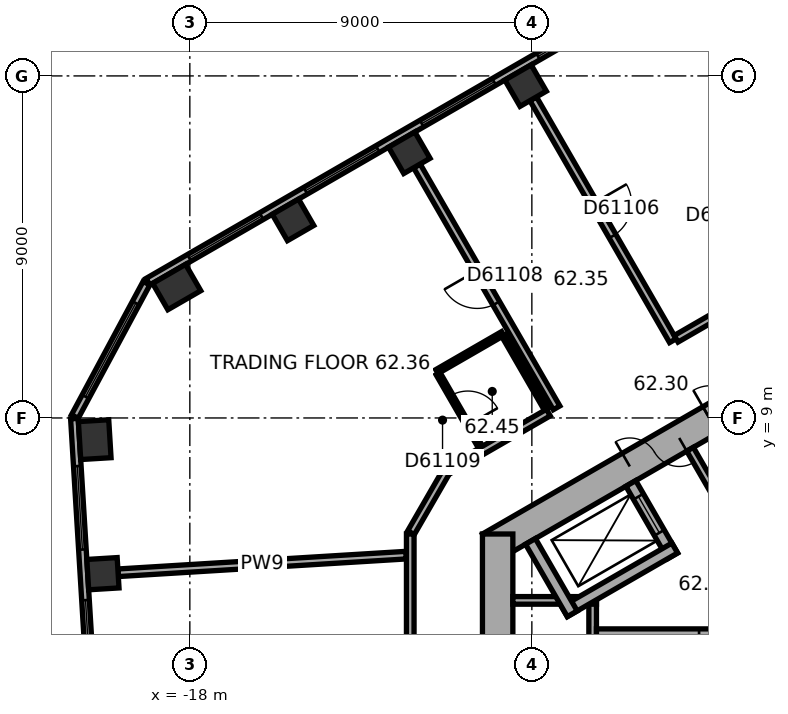
"""IFC4 building model, lengths in metres.
Left out: names, types, materials, properties, quantities, classifications, styles, units other than length and angle.
Written with IfcOpenShell. Run it as: python <this file> out.ifc"""

import sys

from ifc_helpers import new_model, si_unit, direction, frame, frame_2d, origin, origin_2d, place, context, subcontext, project, spatial, rectangle, extrude, element, fill, save


model = new_model("IFC4")
c1 = context("Model", 3, precision=1e-05, world=origin(), true_north=direction((0.0, 1.0)))
c2 = subcontext(c1, "Body", "Model", "MODEL_VIEW")
j1 = project(units=[si_unit("LENGTHUNIT", "METRE"), si_unit("PLANEANGLEUNIT", "RADIAN")], contexts=[c1])
p1 = place(None, origin())
s1 = spatial("IfcSite", under=j1, at=p1, CompositionType="ELEMENT")
p2 = place(p1, origin())
s2 = spatial("IfcBuilding", under=s1, at=p2, CompositionType="ELEMENT")
p3 = place(p2, frame((0.0, 0.0, 251.3)))
s3 = spatial("IfcBuildingStorey", under=s2, at=p3, CompositionType="ELEMENT", Elevation=251.3)
for number, where, z_axis, x_axis in (
    (1, (-9.165, 17.745, 0.0), (0.0, 0.0, 1.0), (-0.866, -0.5, 0.0)),
    (2, (-12.225, 15.978, 0.0), (0.0, 0.0, 1.0), (-0.866, -0.5, 0.0)),
    (3, (-15.285, 14.211, 0.0), (0.0, 0.0, 1.0), (-0.866, -0.5, 0.0)),
):
    element("IfcColumn", number, at=place(p3, frame(where, z_axis=z_axis, x_axis=x_axis)), inside=s3, PredefinedType="COLUMN", context=c2, shape_type="SweptSolid", body=[
        extrude(rectangle(XDim=0.8, YDim=0.8, at=origin_2d()), origin(), (0.0, 0.0, 1.0), 3.7),
    ])
for number, where, z_axis, x_axis in (
    (4, (-18.345, 12.445, 0.0), (0.0, 0.0, 1.0), (-0.866, -0.5, 0.0)),
    (5, (-20.503, 8.429, 0.0), (0.0, 0.0, 1.0), (0.061, -0.998, 0.0)),
):
    element("IfcColumn", number, at=place(p3, frame(where, z_axis=z_axis, x_axis=x_axis)), inside=s3, PredefinedType="COLUMN", context=c2, shape_type="SweptSolid", body=[
        extrude(rectangle(XDim=1.0, YDim=0.8, at=origin_2d()), origin(), (0.0, 0.0, 1.0), 3.7),
    ])
p4 = place(p3, frame((-20.287, 4.902, 0.0), z_axis=(0.0, 0.0, 1.0), x_axis=(0.061048539535, -0.998134798422, 0.0)))
e6 = element("IfcColumn", 6, at=p4, inside=s3, PredefinedType="COLUMN", context=c2, shape_type="SweptSolid", body=[
    extrude(rectangle(XDim=0.8, YDim=0.8, at=origin_2d()), origin(), (0.0, 0.0, 1.0), 3.7),
])
p5 = place(p3, frame((0.2, 11.547, 0.0), z_axis=(0.0, 0.0, 1.0), x_axis=(-0.866023897231, -0.500002609418, 0.0)))
e7 = element("IfcWall", 7, at=p5, inside=s3, PredefinedType="SHEAR", context=c2, shape_type="SweptSolid", body=[
    extrude(rectangle(XDim=11.894, YDim=0.8, at=frame_2d((5.947, 0.0))), origin(), (0.0, 0.0, 1.0), 3.7),
])
p6 = place(p5, frame((6.147, 0.0, 0.0)))
e8 = element("IfcOpeningElement", 8, at=p6, cuts=e7, PredefinedType="OPENING", context=c2, shape_type="SweptSolid", body=[
    extrude(rectangle(XDim=1.5, YDim=2.1, at=frame_2d((0.75, 1.05))), frame((0.0, 0.41, 0.0), z_axis=(0.0, -1.0, 0.0), x_axis=(1.0, 0.0, 0.0)), (0.0, 0.0, 1.0), 0.82),
])
p7 = place(p5, frame((1.697, 0.0, 0.0)))
e9 = element("IfcOpeningElement", 9, at=p7, cuts=e7, PredefinedType="OPENING", context=c2, shape_type="SweptSolid", body=[
    extrude(rectangle(XDim=0.9, YDim=2.1, at=frame_2d((0.45, 1.05))), frame((0.0, 0.41, 0.0), z_axis=(0.0, -1.0, 0.0), x_axis=(1.0, 0.0, 0.0)), (0.0, 0.0, 1.0), 0.82),
])
p8 = place(p5, frame((4.297, 0.0, 0.0)))
e10 = element("IfcOpeningElement", 10, at=p8, cuts=e7, PredefinedType="OPENING", context=c2, shape_type="SweptSolid", body=[
    extrude(rectangle(XDim=0.9, YDim=2.1, at=frame_2d((0.45, 1.05))), frame((0.0, 0.41, 0.0), z_axis=(0.0, -1.0, 0.0), x_axis=(1.0, 0.0, 0.0)), (0.0, 0.0, 1.0), 0.82),
])
p9 = place(p3, frame((-9.9, 5.947, 0.0), z_axis=(0.0, 0.0, 1.0), x_axis=(0.0, -1.0, 0.0)))
e11 = element("IfcWall", 11, at=p9, inside=s3, PredefinedType="SHEAR", context=c2, shape_type="SweptSolid", body=[
    extrude(rectangle(XDim=11.894, YDim=0.8, at=frame_2d((5.947, 0.0))), origin(), (0.0, 0.0, 1.0), 3.7),
])
p10 = place(p9, frame((5.097, 0.0, 0.0)))
e12 = element("IfcOpeningElement", 12, at=p10, cuts=e11, PredefinedType="OPENING", context=c2, shape_type="SweptSolid", body=[
    extrude(rectangle(XDim=1.1, YDim=2.1, at=frame_2d((0.55, 1.05))), frame((0.0, 0.41, 0.0), z_axis=(0.0, -1.0, 0.0), x_axis=(1.0, 0.0, 0.0)), (0.0, 0.0, 1.0), 0.82),
])
p11 = place(p9, frame((7.697, 0.0, 0.0)))
e13 = element("IfcOpeningElement", 13, at=p11, cuts=e11, PredefinedType="OPENING", context=c2, shape_type="SweptSolid", body=[
    extrude(rectangle(XDim=1.1, YDim=2.1, at=frame_2d((0.55, 1.05))), frame((0.0, 0.41, 0.0), z_axis=(0.0, -1.0, 0.0), x_axis=(1.0, 0.0, 0.0)), (0.0, 0.0, 1.0), 0.82),
])
p12 = place(p3, frame((-2.786, 22.005, 0.0), z_axis=(0.0, 0.0, 1.0), x_axis=(-0.866026555358, -0.49999800541, 0.0)))
e14 = element("IfcWall", 14, at=p12, inside=s3, PredefinedType="STANDARD", context=c2, shape_type="SweptSolid", body=[
    extrude(rectangle(XDim=18.841, YDim=0.2, at=frame_2d((9.421, 0.0))), origin(), (0.0, 0.0, 1.0), 3.7),
])
p13 = place(p12, frame((1.254, 0.0, 0.9)))
e15 = element("IfcOpeningElement", 15, at=p13, cuts=e14, PredefinedType="OPENING", context=c2, shape_type="SweptSolid", body=[
    extrude(rectangle(XDim=2.2, YDim=2.0, at=frame_2d((1.1, 1.0))), frame((0.0, 0.11, 0.0), z_axis=(0.0, -1.0, 0.0), x_axis=(1.0, 0.0, 0.0)), (0.0, 0.0, 1.0), 0.22),
])
p14 = place(p12, frame((4.788, 0.0, 0.9)))
e16 = element("IfcOpeningElement", 16, at=p14, cuts=e14, PredefinedType="OPENING", context=c2, shape_type="SweptSolid", body=[
    extrude(rectangle(XDim=2.2, YDim=2.0, at=frame_2d((1.1, 1.0))), frame((0.0, 0.11, 0.0), z_axis=(0.0, -1.0, 0.0), x_axis=(1.0, 0.0, 0.0)), (0.0, 0.0, 1.0), 0.22),
])
p15 = place(p12, frame((8.321, 0.0, 0.9)))
e17 = element("IfcOpeningElement", 17, at=p15, cuts=e14, PredefinedType="OPENING", context=c2, shape_type="SweptSolid", body=[
    extrude(rectangle(XDim=2.2, YDim=2.0, at=frame_2d((1.1, 1.0))), frame((0.0, 0.11, 0.0), z_axis=(0.0, -1.0, 0.0), x_axis=(1.0, 0.0, 0.0)), (0.0, 0.0, 1.0), 0.22),
])
p16 = place(p12, frame((11.855, 0.0, 0.9)))
e18 = element("IfcOpeningElement", 18, at=p16, cuts=e14, PredefinedType="OPENING", context=c2, shape_type="SweptSolid", body=[
    extrude(rectangle(XDim=2.2, YDim=2.0, at=frame_2d((1.1, 1.0))), frame((0.0, 0.11, 0.0), z_axis=(0.0, -1.0, 0.0), x_axis=(1.0, 0.0, 0.0)), (0.0, 0.0, 1.0), 0.22),
])
p17 = place(p12, frame((15.389, 0.0, 0.9)))
e19 = element("IfcOpeningElement", 19, at=p17, cuts=e14, PredefinedType="OPENING", context=c2, shape_type="SweptSolid", body=[
    extrude(rectangle(XDim=2.2, YDim=2.0, at=frame_2d((1.1, 1.0))), frame((0.0, 0.11, 0.0), z_axis=(0.0, -1.0, 0.0), x_axis=(1.0, 0.0, 0.0)), (0.0, 0.0, 1.0), 0.22),
])
p18 = place(p3, frame((-19.141, 12.545, 0.0), z_axis=(0.0, 0.0, 1.0), x_axis=(-0.473306370921, -0.880897882416, 0.0)))
e20 = element("IfcWall", 20, at=p18, inside=s3, PredefinedType="STANDARD", context=c2, shape_type="SweptSolid", body=[
    extrude(rectangle(XDim=3.983, YDim=0.2, at=frame_2d((1.991, 0.0))), origin(), (0.0, 0.0, 1.0), 3.7),
])
p19 = place(p18, frame((0.591, 0.0, 0.9)))
e21 = element("IfcOpeningElement", 21, at=p19, cuts=e20, PredefinedType="OPENING", context=c2, shape_type="SweptSolid", body=[
    extrude(rectangle(XDim=2.8, YDim=2.0, at=frame_2d((1.4, 1.0))), frame((0.0, 0.11, 0.0), z_axis=(0.0, -1.0, 0.0), x_axis=(1.0, 0.0, 0.0)), (0.0, 0.0, 1.0), 0.22),
])
p20 = place(p3, frame((-21.038, 8.984, 0.0), z_axis=(0.0, 0.0, 1.0), x_axis=(0.061043935634, -0.998135079998, 0.0)))
e22 = element("IfcWall", 22, at=p20, inside=s3, PredefinedType="STANDARD", context=c2, shape_type="SweptSolid", body=[
    extrude(rectangle(XDim=18.841, YDim=0.2, at=frame_2d((9.421, 0.0))), origin(), (0.0, 0.0, 1.0), 3.7),
])
p21 = place(p20, frame((1.253, 0.0, 0.9)))
e23 = element("IfcOpeningElement", 23, at=p21, cuts=e22, PredefinedType="OPENING", context=c2, shape_type="SweptSolid", body=[
    extrude(rectangle(XDim=2.2, YDim=2.0, at=frame_2d((1.1, 1.0))), frame((0.0, 0.11, 0.0), z_axis=(0.0, -1.0, 0.0), x_axis=(1.0, 0.0, 0.0)), (0.0, 0.0, 1.0), 0.22),
])
p22 = place(p20, frame((4.786, 0.0, 0.9)))
e24 = element("IfcOpeningElement", 24, at=p22, cuts=e22, PredefinedType="OPENING", context=c2, shape_type="SweptSolid", body=[
    extrude(rectangle(XDim=2.2, YDim=2.0, at=frame_2d((1.1, 1.0))), frame((0.0, 0.11, 0.0), z_axis=(0.0, -1.0, 0.0), x_axis=(1.0, 0.0, 0.0)), (0.0, 0.0, 1.0), 0.22),
])
p23 = place(p20, frame((8.32, 0.0, 0.9)))
e25 = element("IfcOpeningElement", 25, at=p23, cuts=e22, PredefinedType="OPENING", context=c2, shape_type="SweptSolid", body=[
    extrude(rectangle(XDim=2.2, YDim=2.0, at=frame_2d((1.1, 1.0))), frame((0.0, 0.11, 0.0), z_axis=(0.0, -1.0, 0.0), x_axis=(1.0, 0.0, 0.0)), (0.0, 0.0, 1.0), 0.22),
])
p24 = place(p20, frame((11.854, 0.0, 0.9)))
e26 = element("IfcOpeningElement", 26, at=p24, cuts=e22, PredefinedType="OPENING", context=c2, shape_type="SweptSolid", body=[
    extrude(rectangle(XDim=2.2, YDim=2.0, at=frame_2d((1.1, 1.0))), frame((0.0, 0.11, 0.0), z_axis=(0.0, -1.0, 0.0), x_axis=(1.0, 0.0, 0.0)), (0.0, 0.0, 1.0), 0.22),
])
p25 = place(p20, frame((15.387, 0.0, 0.9)))
e27 = element("IfcOpeningElement", 27, at=p25, cuts=e22, PredefinedType="OPENING", context=c2, shape_type="SweptSolid", body=[
    extrude(rectangle(XDim=2.2, YDim=2.0, at=frame_2d((1.1, 1.0))), frame((0.0, 0.11, 0.0), z_axis=(0.0, -1.0, 0.0), x_axis=(1.0, 0.0, 0.0)), (0.0, 0.0, 1.0), 0.22),
])
p26 = place(p3, frame((-3.737, 6.272, 0.0), z_axis=(0.0, 0.0, 1.0), x_axis=(-0.50002983664, 0.866008176907, 0.0)))
e28 = element("IfcWall", 28, at=p26, inside=s3, PredefinedType="PARTITIONING", context=c2, shape_type="SweptSolid", body=[
    extrude(rectangle(XDim=2.2, YDim=0.2, at=frame_2d((1.1, 0.0))), origin(), (0.0, 0.0, 1.0), 3.35),
])
p27 = place(p3, frame((-7.4, 4.3, 0.0), z_axis=(0.0, 0.0, 1.0), x_axis=(0.0, -1.0, 0.0)))
e29 = element("IfcWall", 29, at=p27, inside=s3, PredefinedType="PARTITIONING", context=c2, shape_type="SweptSolid", body=[
    extrude(rectangle(XDim=8.0, YDim=0.2, at=frame_2d((4.0, 0.0))), origin(), (0.0, 0.0, 1.0), 3.35),
])
p28 = place(p3, frame((-7.3, 4.2, 0.0), z_axis=(0.0, 0.0, 1.0), x_axis=(-1.0, 0.0, 0.0)))
e30 = element("IfcWall", 30, at=p28, inside=s3, PredefinedType="PARTITIONING", context=c2, shape_type="SweptSolid", body=[
    extrude(rectangle(XDim=2.2, YDim=0.2, at=frame_2d((1.1, 0.0))), origin(), (0.0, 0.0, 1.0), 3.35),
])
p29 = place(p3, frame((-2.6, 3.3, 0.0), z_axis=(0.0, 0.0, 1.0), x_axis=(-1.0, 0.0, 0.0)))
e31 = element("IfcWall", 31, at=p29, inside=s3, PredefinedType="SHEAR", context=c2, shape_type="SweptSolid", body=[
    extrude(rectangle(XDim=4.7, YDim=0.3, at=frame_2d((2.35, 0.0))), origin(), (0.0, 0.0, 1.0), 3.35),
])
p30 = place(p29, frame((0.8, 0.0, 0.0)))
e32 = element("IfcOpeningElement", 32, at=p30, cuts=e31, PredefinedType="OPENING", context=c2, shape_type="SweptSolid", body=[
    extrude(rectangle(XDim=1.2, YDim=2.1, at=frame_2d((0.6, 1.05))), frame((0.0, 0.16, 0.0), z_axis=(0.0, -1.0, 0.0), x_axis=(1.0, 0.0, 0.0)), (0.0, 0.0, 1.0), 0.32),
])
p31 = place(p3, frame((-5.295, 5.372, 0.0), z_axis=(0.0, 0.0, 1.0), x_axis=(-0.500077893725, 0.86598042715, 0.0)))
e33 = element("IfcWall", 33, at=p31, inside=s3, PredefinedType="SHEAR", context=c2, shape_type="SweptSolid", body=[
    extrude(rectangle(XDim=2.2, YDim=0.3, at=frame_2d((1.1, 0.0))), origin(), (0.0, 0.0, 1.0), 3.35),
])
p32 = place(p31, frame((0.7, 0.0, 0.0)))
e34 = element("IfcOpeningElement", 34, at=p32, cuts=e33, PredefinedType="OPENING", context=c2, shape_type="SweptSolid", body=[
    extrude(rectangle(XDim=1.1, YDim=2.1, at=frame_2d((0.55, 1.05))), frame((0.0, 0.16, 0.0), z_axis=(0.0, -1.0, 0.0), x_axis=(1.0, 0.0, 0.0)), (0.0, 0.0, 1.0), 0.32),
])
p33 = place(p3, frame((-5.24, 5.577, 0.0), z_axis=(0.0, 0.0, 1.0), x_axis=(-0.866014461049, -0.500018952895, 0.0)))
e35 = element("IfcWall", 35, at=p33, inside=s3, PredefinedType="SHEAR", context=c2, shape_type="SweptSolid", body=[
    extrude(rectangle(XDim=3.35, YDim=0.3, at=frame_2d((1.675, 0.0))), origin(), (0.0, 0.0, 1.0), 3.35),
])
p34 = place(p3, frame((-7.937, 3.847, 0.0), z_axis=(0.0, 0.0, 1.0), x_axis=(-0.50002983664, 0.866008176907, 0.0)))
e36 = element("IfcWall", 36, at=p34, inside=s3, PredefinedType="SHEAR", context=c2, shape_type="SweptSolid", body=[
    extrude(rectangle(XDim=2.2, YDim=0.3, at=frame_2d((1.1, 0.0))), origin(), (0.0, 0.0, 1.0), 3.35),
])
p35 = place(p3, frame((-19.888, 4.927, 0.0), z_axis=(0.0, 0.0, 1.0), x_axis=(0.998133794525, 0.061064950896, 0.0)))
e37 = element("IfcWall", 37, at=p35, inside=s3, PredefinedType="PARTITIONING", context=c2, shape_type="SweptSolid", body=[
    extrude(rectangle(XDim=7.592, YDim=0.2, at=frame_2d((3.796, 0.0))), origin(), (0.0, 0.0, 1.0), 3.35),
])
p36 = place(p3, frame((-12.2, 5.947, 0.0), z_axis=(0.0, 0.0, 1.0), x_axis=(0.0, -1.0, 0.0)))
e38 = element("IfcWall", 38, at=p36, inside=s3, PredefinedType="PARTITIONING", context=c2, shape_type="SweptSolid", body=[
    extrude(rectangle(XDim=3.746, YDim=0.2, at=frame_2d((1.873, 0.0))), origin(), (0.0, 0.0, 1.0), 3.35),
])
p37 = place(p3, frame((-12.025, 15.632, 0.0), z_axis=(0.0, 0.0, 1.0), x_axis=(0.499983153418, -0.866035129944, 0.0)))
e39 = element("IfcWall", 39, at=p37, inside=s3, PredefinedType="PARTITIONING", context=c2, shape_type="SweptSolid", body=[
    extrude(rectangle(XDim=7.35, YDim=0.2, at=frame_2d((3.675, 0.0))), origin(), (0.0, 0.0, 1.0), 3.35),
])
p38 = place(p37, frame((3.175, 0.0, 0.0)))
e40 = element("IfcOpeningElement", 40, at=p38, cuts=e39, PredefinedType="OPENING", context=c2, shape_type="SweptSolid", body=[
    extrude(rectangle(XDim=1.0, YDim=2.1, at=frame_2d((0.5, 1.05))), frame((0.0, 0.11, 0.0), z_axis=(0.0, -1.0, 0.0), x_axis=(1.0, 0.0, 0.0)), (0.0, 0.0, 1.0), 0.22),
])
p39 = place(p3, frame((-11.499, 10.22, 0.0), z_axis=(0.0, 0.0, 1.0), x_axis=(0.866010750942, 0.50002537861, 0.0)))
e41 = element("IfcWall", 41, at=p39, inside=s3, PredefinedType="PARTITIONING", context=c2, shape_type="SweptSolid", body=[
    extrude(rectangle(XDim=2.0, YDim=0.12, at=frame_2d((1.0, 0.0))), origin(), (0.0, 0.0, 1.0), 3.35),
])
p40 = place(p3, frame((-11.25, 7.592, 0.0), z_axis=(0.0, 0.0, 1.0), x_axis=(-0.499964847546, -0.866045698112, 0.0)))
e42 = element("IfcWall", 42, at=p40, inside=s3, PredefinedType="PARTITIONING", context=c2, shape_type="SweptSolid", body=[
    extrude(rectangle(XDim=1.86, YDim=0.2, at=frame_2d((0.93, 0.0))), origin(), (0.0, 0.0, 1.0), 3.35),
])
p41 = place(p3, frame((-10.348, 8.228, 0.0), z_axis=(0.0, 0.0, 1.0), x_axis=(-0.500030632641, 0.866007717299, 0.0)))
e43 = element("IfcWall", 43, at=p41, inside=s3, PredefinedType="PARTITIONING", context=c2, shape_type="SweptSolid", body=[
    extrude(rectangle(XDim=2.24, YDim=0.12, at=frame_2d((1.12, 0.0))), origin(), (0.0, 0.0, 1.0), 3.35),
])
p42 = place(p41, frame((0.67, 0.0, 0.0)))
e44 = element("IfcOpeningElement", 44, at=p42, cuts=e43, PredefinedType="OPENING", context=c2, shape_type="SweptSolid", body=[
    extrude(rectangle(XDim=0.9, YDim=2.1, at=frame_2d((0.45, 1.05))), frame((0.0, 0.07, 0.0), z_axis=(0.0, -1.0, 0.0), x_axis=(1.0, 0.0, 0.0)), (0.0, 0.0, 1.0), 0.14),
])
p43 = place(p3, frame((-9.737, 11.168, 0.0), z_axis=(0.0, 0.0, 1.0), x_axis=(0.500030632641, -0.866007717299, 0.0)))
e45 = element("IfcWall", 45, at=p43, inside=s3, PredefinedType="PARTITIONING", context=c2, shape_type="SweptSolid", body=[
    extrude(rectangle(XDim=2.24, YDim=0.12, at=frame_2d((1.12, 0.0))), origin(), (0.0, 0.0, 1.0), 3.35),
])
p44 = place(p3, frame((-8.965, 17.399, 0.0), z_axis=(0.0, 0.0, 1.0), x_axis=(0.499993683172, -0.866029050776, 0.0)))
e46 = element("IfcWall", 46, at=p44, inside=s3, PredefinedType="PARTITIONING", context=c2, shape_type="SweptSolid", body=[
    extrude(rectangle(XDim=7.35, YDim=0.2, at=frame_2d((3.675, 0.0))), origin(), (0.0, 0.0, 1.0), 2.65),
])
p45 = place(p44, frame((3.175, 0.0, 0.0)))
e47 = element("IfcOpeningElement", 47, at=p45, cuts=e46, PredefinedType="OPENING", context=c2, shape_type="SweptSolid", body=[
    extrude(rectangle(XDim=1.0, YDim=2.1, at=frame_2d((0.5, 1.05))), frame((0.0, 0.11, 0.0), z_axis=(0.0, -1.0, 0.0), x_axis=(1.0, 0.0, 0.0)), (0.0, 0.0, 1.0), 0.22),
])
p46 = place(p3, frame((-8.566, 9.142, 0.0), z_axis=(0.0, 0.0, 1.0), x_axis=(-0.865999496279, -0.500044870432, 0.0)))
e48 = element("IfcWall", 48, at=p46, inside=s3, PredefinedType="PARTITIONING", context=c2, shape_type="SweptSolid", body=[
    extrude(rectangle(XDim=3.059, YDim=0.2, at=frame_2d((1.529, 0.0))), origin(), (0.0, 0.0, 1.0), 3.35),
])
p47 = place(p3, frame((-1.167, 13.414, 0.0), z_axis=(0.0, 0.0, 1.0), x_axis=(-0.866023347809, -0.500003561037, 0.0)))
e49 = element("IfcWall", 49, at=p47, inside=s3, PredefinedType="PARTITIONING", context=c2, shape_type="SweptSolid", body=[
    extrude(rectangle(XDim=4.661, YDim=0.2, at=frame_2d((2.331, 0.0))), origin(), (0.0, 0.0, 1.0), 3.35),
])
p48 = place(p14, origin())
e50 = element("IfcWindow", 50, at=p48, inside=s3, PartitioningType="SINGLE_PANEL", PredefinedType="WINDOW", context=c2, shape_type="SweptSolid", body=[
    extrude(rectangle(XDim=2.2, YDim=2.0, at=frame_2d((1.1, 1.0))), frame((0.0, 0.03, 0.0), z_axis=(0.0, -1.0, 0.0), x_axis=(1.0, 0.0, 0.0)), (0.0, 0.0, 1.0), 0.06),
])
fill(e16, e50)
p49 = place(p15, origin())
e51 = element("IfcWindow", 51, at=p49, inside=s3, PartitioningType="SINGLE_PANEL", PredefinedType="WINDOW", context=c2, shape_type="SweptSolid", body=[
    extrude(rectangle(XDim=2.2, YDim=2.0, at=frame_2d((1.1, 1.0))), frame((0.0, 0.03, 0.0), z_axis=(0.0, -1.0, 0.0), x_axis=(1.0, 0.0, 0.0)), (0.0, 0.0, 1.0), 0.06),
])
fill(e17, e51)
p50 = place(p16, origin())
e52 = element("IfcWindow", 52, at=p50, inside=s3, PartitioningType="SINGLE_PANEL", PredefinedType="WINDOW", context=c2, shape_type="SweptSolid", body=[
    extrude(rectangle(XDim=2.2, YDim=2.0, at=frame_2d((1.1, 1.0))), frame((0.0, 0.03, 0.0), z_axis=(0.0, -1.0, 0.0), x_axis=(1.0, 0.0, 0.0)), (0.0, 0.0, 1.0), 0.06),
])
fill(e18, e52)
p51 = place(p17, origin())
e53 = element("IfcWindow", 53, at=p51, inside=s3, PartitioningType="SINGLE_PANEL", PredefinedType="WINDOW", context=c2, shape_type="SweptSolid", body=[
    extrude(rectangle(XDim=2.2, YDim=2.0, at=frame_2d((1.1, 1.0))), frame((0.0, 0.03, 0.0), z_axis=(0.0, -1.0, 0.0), x_axis=(1.0, 0.0, 0.0)), (0.0, 0.0, 1.0), 0.06),
])
fill(e19, e53)
p52 = place(p19, origin())
e54 = element("IfcWindow", 54, at=p52, inside=s3, PartitioningType="SINGLE_PANEL", PredefinedType="WINDOW", context=c2, shape_type="SweptSolid", body=[
    extrude(rectangle(XDim=2.8, YDim=2.0, at=frame_2d((1.4, 1.0))), frame((0.0, 0.03, 0.0), z_axis=(0.0, -1.0, 0.0), x_axis=(1.0, 0.0, 0.0)), (0.0, 0.0, 1.0), 0.06),
])
fill(e21, e54)
p53 = place(p21, origin())
e55 = element("IfcWindow", 55, at=p53, inside=s3, PartitioningType="SINGLE_PANEL", PredefinedType="WINDOW", context=c2, shape_type="SweptSolid", body=[
    extrude(rectangle(XDim=2.2, YDim=2.0, at=frame_2d((1.1, 1.0))), frame((0.0, 0.03, 0.0), z_axis=(0.0, -1.0, 0.0), x_axis=(1.0, 0.0, 0.0)), (0.0, 0.0, 1.0), 0.06),
])
fill(e23, e55)
p54 = place(p22, origin())
e56 = element("IfcWindow", 56, at=p54, inside=s3, PartitioningType="SINGLE_PANEL", PredefinedType="WINDOW", context=c2, shape_type="SweptSolid", body=[
    extrude(rectangle(XDim=2.2, YDim=2.0, at=frame_2d((1.1, 1.0))), frame((0.0, 0.03, 0.0), z_axis=(0.0, -1.0, 0.0), x_axis=(1.0, 0.0, 0.0)), (0.0, 0.0, 1.0), 0.06),
])
fill(e24, e56)
p55 = place(p6, origin())
e57 = element("IfcDoor", 57, at=p55, inside=s3, OperationType="DOUBLE_DOOR_SINGLE_SWING", PredefinedType="DOOR", context=c2, shape_type="SweptSolid", body=[
    extrude(rectangle(XDim=1.5, YDim=2.1, at=frame_2d((0.75, 1.05))), frame((0.0, 0.025, 0.0), z_axis=(0.0, -1.0, 0.0), x_axis=(1.0, 0.0, 0.0)), (0.0, 0.0, 1.0), 0.05),
])
fill(e8, e57)
p56 = place(p30, origin())
e58 = element("IfcDoor", 58, at=p56, inside=s3, OperationType="SINGLE_SWING_RIGHT", PredefinedType="DOOR", context=c2, shape_type="SweptSolid", body=[
    extrude(rectangle(XDim=1.2, YDim=2.1, at=frame_2d((0.6, 1.05))), frame((0.0, 0.025, 0.0), z_axis=(0.0, -1.0, 0.0), x_axis=(1.0, 0.0, 0.0)), (0.0, 0.0, 1.0), 0.05),
])
fill(e32, e58)
p57 = place(p32, origin())
e59 = element("IfcDoor", 59, at=p57, inside=s3, OperationType="DOUBLE_DOOR_SLIDING", PredefinedType="DOOR", context=c2, shape_type="SweptSolid", body=[
    extrude(rectangle(XDim=1.1, YDim=2.1, at=frame_2d((0.55, 1.05))), frame((0.0, 0.025, 0.0), z_axis=(0.0, -1.0, 0.0), x_axis=(1.0, 0.0, 0.0)), (0.0, 0.0, 1.0), 0.05),
])
fill(e34, e59)
p58 = place(p45, origin())
e60 = element("IfcDoor", 60, at=p58, inside=s3, OperationType="SINGLE_SWING_LEFT", PredefinedType="DOOR", context=c2, shape_type="SweptSolid", body=[
    extrude(rectangle(XDim=1.0, YDim=2.1, at=frame_2d((0.5, 1.05))), frame((0.0, 0.025, 0.0), z_axis=(0.0, -1.0, 0.0), x_axis=(1.0, 0.0, 0.0)), (0.0, 0.0, 1.0), 0.05),
])
fill(e47, e60)
p59 = place(p38, origin())
e61 = element("IfcDoor", 61, at=p59, inside=s3, OperationType="SINGLE_SWING_LEFT", PredefinedType="DOOR", context=c2, shape_type="SweptSolid", body=[
    extrude(rectangle(XDim=1.0, YDim=2.1, at=frame_2d((0.5, 1.05))), frame((0.0, 0.025, 0.0), z_axis=(0.0, -1.0, 0.0), x_axis=(1.0, 0.0, 0.0)), (0.0, 0.0, 1.0), 0.05),
])
fill(e40, e61)
p60 = place(p42, origin())
e62 = element("IfcDoor", 62, at=p60, inside=s3, OperationType="SINGLE_SWING_LEFT", PredefinedType="DOOR", context=c2, shape_type="SweptSolid", body=[
    extrude(rectangle(XDim=0.9, YDim=2.1, at=frame_2d((0.45, 1.05))), frame((0.0, 0.025, 0.0), z_axis=(0.0, -1.0, 0.0), x_axis=(1.0, 0.0, 0.0)), (0.0, 0.0, 1.0), 0.05),
])
fill(e44, e62)
save(model, sys.argv[1])
